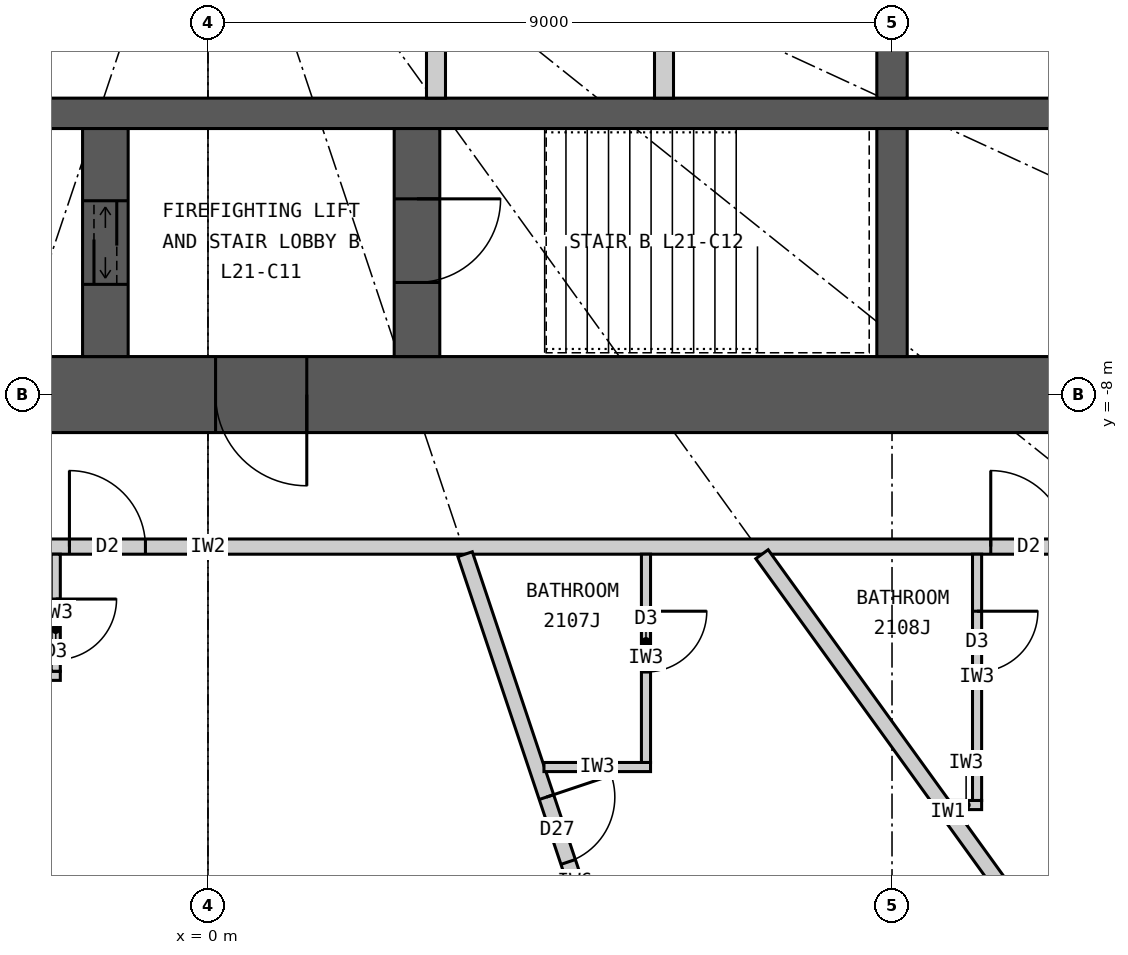
"""IFC4 building model, lengths in metres.
Left out: names, types, materials, properties, quantities, classifications, styles, units other than length and angle.
Written with IfcOpenShell. Run it as: python <this file> out.ifc"""

import sys

from ifc_helpers import new_model, si_unit, direction, frame, frame_2d, origin, place, context, subcontext, project, spatial, rectangle, extrude, element, fill, save


model = new_model("IFC4")
c1 = context("Model", 3, precision=1e-05, world=origin(), true_north=direction((0.0, 1.0)))
c2 = subcontext(c1, "Body", "Model", "MODEL_VIEW")
j1 = project(units=[si_unit("LENGTHUNIT", "METRE"), si_unit("PLANEANGLEUNIT", "RADIAN")], contexts=[c1])
p1 = place(None, origin())
s1 = spatial("IfcSite", under=j1, at=p1, CompositionType="ELEMENT")
p2 = place(p1, origin())
s2 = spatial("IfcBuilding", under=s1, at=p2, CompositionType="ELEMENT")
p3 = place(p2, frame((0.0, 0.0, 83.7)))
s3 = spatial("IfcBuildingStorey", under=s2, at=p3, CompositionType="ELEMENT", Elevation=83.7)
p4 = place(p3, frame((12.5, -8.0, 0.0), z_axis=(0.0, 0.0, 1.0), x_axis=(-1.0, 0.0, 0.0)))
e1 = element("IfcWall", 1, at=p4, inside=s3, PredefinedType="SHEAR", context=c2, shape_type="SweptSolid", body=[
    extrude(rectangle(XDim=25.0, YDim=1.0, at=frame_2d((12.5, 0.0))), origin(), (0.0, 0.0, 1.0), 3.3),
])
p5 = place(p4, frame((11.2, 0.0, 0.0)))
e2 = element("IfcOpeningElement", 2, at=p5, cuts=e1, PredefinedType="OPENING", context=c2, shape_type="SweptSolid", body=[
    extrude(rectangle(XDim=1.2, YDim=2.2, at=frame_2d((0.6, 1.1))), frame((0.0, 0.51, 0.0), z_axis=(0.0, -1.0, 0.0), x_axis=(1.0, 0.0, 0.0)), (0.0, 0.0, 1.0), 1.02),
])
p6 = place(p4, frame((18.8, 0.0, 0.0)))
e3 = element("IfcOpeningElement", 3, at=p6, cuts=e1, PredefinedType="OPENING", context=c2, shape_type="SweptSolid", body=[
    extrude(rectangle(XDim=0.9, YDim=2.2, at=frame_2d((0.45, 1.1))), frame((0.0, 0.51, 0.0), z_axis=(0.0, -1.0, 0.0), x_axis=(1.0, 0.0, 0.0)), (0.0, 0.0, 1.0), 1.02),
])
p7 = place(p3, frame((-11.5, -4.3, 0.0), z_axis=(0.0, 0.0, 1.0), x_axis=(1.0, 0.0, 0.0)))
e4 = element("IfcWall", 4, at=p7, inside=s3, PredefinedType="SHEAR", context=c2, shape_type="SweptSolid", body=[
    extrude(rectangle(XDim=23.0, YDim=0.4, at=frame_2d((11.5, 0.0))), origin(), (0.0, 0.0, 1.0), 3.3),
])
p8 = place(p3, frame((9.0, -4.1, 0.0), z_axis=(0.0, 0.0, 1.0), x_axis=(0.0, 1.0, 0.0)))
e5 = element("IfcWall", 5, at=p8, inside=s3, PredefinedType="SHEAR", context=c2, shape_type="SweptSolid", body=[
    extrude(rectangle(XDim=2.35, YDim=0.4, at=frame_2d((1.175, 0.0))), origin(), (0.0, 0.0, 1.0), 3.3),
])
p9 = place(p3, frame((9.0, -7.5, 0.0), z_axis=(0.0, 0.0, 1.0), x_axis=(0.0, 1.0, 0.0)))
e6 = element("IfcWall", 6, at=p9, inside=s3, PredefinedType="SHEAR", context=c2, shape_type="SweptSolid", body=[
    extrude(rectangle(XDim=3.0, YDim=0.4, at=frame_2d((1.5, 0.0))), origin(), (0.0, 0.0, 1.0), 3.3),
])
p10 = place(p3, frame((2.75, -7.5, 0.0), z_axis=(0.0, 0.0, 1.0), x_axis=(0.0, 1.0, 0.0)))
e7 = element("IfcWall", 7, at=p10, inside=s3, PredefinedType="SHEAR", context=c2, shape_type="SweptSolid", body=[
    extrude(rectangle(XDim=3.0, YDim=0.6, at=frame_2d((1.5, 0.0))), origin(), (0.0, 0.0, 1.0), 3.3),
])
p11 = place(p10, frame((0.975, 0.0, 0.0)))
e8 = element("IfcOpeningElement", 8, at=p11, cuts=e7, PredefinedType="OPENING", context=c2, shape_type="SweptSolid", body=[
    extrude(rectangle(XDim=1.1, YDim=2.2, at=frame_2d((0.55, 1.1))), frame((0.0, 0.31, 0.0), z_axis=(0.0, -1.0, 0.0), x_axis=(1.0, 0.0, 0.0)), (0.0, 0.0, 1.0), 0.62),
])
p12 = place(p3, frame((-1.35, -7.5, 0.0), z_axis=(0.0, 0.0, 1.0), x_axis=(0.0, 1.0, 0.0)))
e9 = element("IfcWall", 9, at=p12, inside=s3, PredefinedType="SHEAR", context=c2, shape_type="SweptSolid", body=[
    extrude(rectangle(XDim=3.0, YDim=0.6, at=frame_2d((1.5, 0.0))), origin(), (0.0, 0.0, 1.0), 3.3),
])
p13 = place(p12, frame((0.95, 0.0, 0.0)))
e10 = element("IfcOpeningElement", 10, at=p13, cuts=e9, PredefinedType="OPENING", context=c2, shape_type="SweptSolid", body=[
    extrude(rectangle(XDim=1.1, YDim=2.2, at=frame_2d((0.55, 1.1))), frame((0.0, 0.31, 0.0), z_axis=(0.0, -1.0, 0.0), x_axis=(1.0, 0.0, 0.0)), (0.0, 0.0, 1.0), 0.62),
])
for number, where, z_axis, x_axis in (
    (11, (3.0, -4.1, 0.0), (0.0, 0.0, 1.0), (0.0, 1.0, 0.0)),
    (12, (6.0, -4.1, 0.0), (0.0, 0.0, 1.0), (0.0, 1.0, 0.0)),
):
    element("IfcWall", number, at=place(p3, frame(where, z_axis=z_axis, x_axis=x_axis)), inside=s3, PredefinedType="PARTITIONING", context=c2, shape_type="SweptSolid", body=[
        extrude(rectangle(XDim=2.35, YDim=0.25, at=frame_2d((1.175, 0.0))), origin(), (0.0, 0.0, 1.0), 3.3),
    ])
p14 = place(p3, frame((14.1, -10.0, 0.0), z_axis=(0.0, 0.0, 1.0), x_axis=(-1.0, 0.0, 0.0)))
e13 = element("IfcWall", 13, at=p14, inside=s3, PredefinedType="PARTITIONING", context=c2, shape_type="SweptSolid", body=[
    extrude(rectangle(XDim=28.2, YDim=0.2, at=frame_2d((14.1, 0.0))), origin(), (0.0, 0.0, 1.0), 3.12),
])
p15 = place(p14, frame((23.865, 0.0, 0.0)))
e14 = element("IfcOpeningElement", 14, at=p15, cuts=e13, PredefinedType="OPENING", context=c2, shape_type="SweptSolid", body=[
    extrude(rectangle(XDim=1.0, YDim=2.2, at=frame_2d((0.5, 1.1))), frame((0.0, 0.11, 0.0), z_axis=(0.0, -1.0, 0.0), x_axis=(1.0, 0.0, 0.0)), (0.0, 0.0, 1.0), 0.22),
])
p16 = place(p14, frame((18.529, 0.0, 0.0)))
e15 = element("IfcOpeningElement", 15, at=p16, cuts=e13, PredefinedType="OPENING", context=c2, shape_type="SweptSolid", body=[
    extrude(rectangle(XDim=1.0, YDim=2.2, at=frame_2d((0.5, 1.1))), frame((0.0, 0.11, 0.0), z_axis=(0.0, -1.0, 0.0), x_axis=(1.0, 0.0, 0.0)), (0.0, 0.0, 1.0), 0.22),
])
p17 = place(p14, frame((14.923, 0.0, 0.0)))
e16 = element("IfcOpeningElement", 16, at=p17, cuts=e13, PredefinedType="OPENING", context=c2, shape_type="SweptSolid", body=[
    extrude(rectangle(XDim=1.0, YDim=2.2, at=frame_2d((0.5, 1.1))), frame((0.0, 0.11, 0.0), z_axis=(0.0, -1.0, 0.0), x_axis=(1.0, 0.0, 0.0)), (0.0, 0.0, 1.0), 0.22),
])
p18 = place(p14, frame((2.801, 0.0, 0.0)))
e17 = element("IfcOpeningElement", 17, at=p18, cuts=e13, PredefinedType="OPENING", context=c2, shape_type="SweptSolid", body=[
    extrude(rectangle(XDim=1.0, YDim=2.2, at=frame_2d((0.5, 1.1))), frame((0.0, 0.11, 0.0), z_axis=(0.0, -1.0, 0.0), x_axis=(1.0, 0.0, 0.0)), (0.0, 0.0, 1.0), 0.22),
])
p19 = place(p3, frame((3.383, -10.1, 0.0), z_axis=(0.0, 0.0, 1.0), x_axis=(0.31759592231, -0.948226149256, 0.0)))
e18 = element("IfcWall", 18, at=p19, inside=s3, PredefinedType="PARTITIONING", context=c2, shape_type="SweptSolid", body=[
    extrude(rectangle(XDim=9.098, YDim=0.2, at=frame_2d((4.549, 0.0))), origin(), (0.0, 0.0, 1.0), 2.32),
])
p20 = place(p19, frame((3.37, 0.0, 0.0)))
e19 = element("IfcOpeningElement", 19, at=p20, cuts=e18, PredefinedType="OPENING", context=c2, shape_type="SweptSolid", body=[
    extrude(rectangle(XDim=0.9, YDim=2.1, at=frame_2d((0.45, 1.05))), frame((0.0, 0.11, 0.0), z_axis=(0.0, -1.0, 0.0), x_axis=(1.0, 0.0, 0.0)), (0.0, 0.0, 1.0), 0.22),
])
p21 = place(p3, frame((7.289, -10.1, 0.0), z_axis=(0.0, 0.0, 1.0), x_axis=(0.585198353053, -0.810890182197, 0.0)))
e20 = element("IfcWall", 20, at=p21, inside=s3, PredefinedType="PARTITIONING", context=c2, shape_type="SweptSolid", body=[
    extrude(rectangle(XDim=8.36, YDim=0.2, at=frame_2d((4.18, 0.0))), origin(), (0.0, 0.0, 1.0), 2.32),
])
p22 = place(p3, frame((-3.819, -11.7, 0.0), z_axis=(0.0, 0.0, 1.0), x_axis=(1.0, 0.0, 0.0)))
e21 = element("IfcWall", 21, at=p22, inside=s3, PredefinedType="PARTITIONING", context=c2, shape_type="SweptSolid", body=[
    extrude(rectangle(XDim=1.876, YDim=0.12, at=frame_2d((0.938, 0.0))), origin(), (0.0, 0.0, 1.0), 3.12),
])
p23 = place(p3, frame((-2.003, -10.1, 0.0), z_axis=(0.0, 0.0, 1.0), x_axis=(0.0, -1.0, 0.0)))
e22 = element("IfcWall", 22, at=p23, inside=s3, PredefinedType="PARTITIONING", context=c2, shape_type="SweptSolid", body=[
    extrude(rectangle(XDim=1.54, YDim=0.12, at=frame_2d((0.77, 0.0))), origin(), (0.0, 0.0, 1.0), 3.12),
])
p24 = place(p23, frame((0.59, 0.0, 0.0)))
e23 = element("IfcOpeningElement", 23, at=p24, cuts=e22, PredefinedType="OPENING", context=c2, shape_type="SweptSolid", body=[
    extrude(rectangle(XDim=0.8, YDim=2.1, at=frame_2d((0.4, 1.05))), frame((0.0, 0.07, 0.0), z_axis=(0.0, -1.0, 0.0), x_axis=(1.0, 0.0, 0.0)), (0.0, 0.0, 1.0), 0.14),
])
p25 = place(p3, frame((4.421, -12.9, 0.0), z_axis=(0.0, 0.0, 1.0), x_axis=(1.0, 0.0, 0.0)))
e24 = element("IfcWall", 24, at=p25, inside=s3, PredefinedType="PARTITIONING", context=c2, shape_type="SweptSolid", body=[
    extrude(rectangle(XDim=1.402, YDim=0.12, at=frame_2d((0.701, 0.0))), origin(), (0.0, 0.0, 1.0), 3.12),
])
p26 = place(p3, frame((5.763, -10.1, 0.0), z_axis=(0.0, 0.0, 1.0), x_axis=(0.0, -1.0, 0.0)))
e25 = element("IfcWall", 25, at=p26, inside=s3, PredefinedType="PARTITIONING", context=c2, shape_type="SweptSolid", body=[
    extrude(rectangle(XDim=2.74, YDim=0.12, at=frame_2d((1.37, 0.0))), origin(), (0.0, 0.0, 1.0), 3.12),
])
p27 = place(p26, frame((0.75, 0.0, 0.0)))
e26 = element("IfcOpeningElement", 26, at=p27, cuts=e25, PredefinedType="OPENING", context=c2, shape_type="SweptSolid", body=[
    extrude(rectangle(XDim=0.8, YDim=2.1, at=frame_2d((0.4, 1.05))), frame((0.0, 0.07, 0.0), z_axis=(0.0, -1.0, 0.0), x_axis=(1.0, 0.0, 0.0)), (0.0, 0.0, 1.0), 0.14),
])
p28 = place(p3, frame((9.771, -13.4, 0.0), z_axis=(0.0, 0.0, 1.0), x_axis=(1.0, 0.0, 0.0)))
e27 = element("IfcWall", 27, at=p28, inside=s3, PredefinedType="PARTITIONING", context=c2, shape_type="SweptSolid", body=[
    extrude(rectangle(XDim=0.408, YDim=0.12, at=frame_2d((0.204, 0.0))), origin(), (0.0, 0.0, 1.0), 3.12),
])
p29 = place(p3, frame((10.119, -10.1, 0.0), z_axis=(0.0, 0.0, 1.0), x_axis=(0.0, -1.0, 0.0)))
e28 = element("IfcWall", 28, at=p29, inside=s3, PredefinedType="PARTITIONING", context=c2, shape_type="SweptSolid", body=[
    extrude(rectangle(XDim=3.24, YDim=0.12, at=frame_2d((1.62, 0.0))), origin(), (0.0, 0.0, 1.0), 3.12),
])
p30 = place(p29, frame((0.75, 0.0, 0.0)))
e29 = element("IfcOpeningElement", 29, at=p30, cuts=e28, PredefinedType="OPENING", context=c2, shape_type="SweptSolid", body=[
    extrude(rectangle(XDim=0.8, YDim=2.1, at=frame_2d((0.4, 1.05))), frame((0.0, 0.07, 0.0), z_axis=(0.0, -1.0, 0.0), x_axis=(1.0, 0.0, 0.0)), (0.0, 0.0, 1.0), 0.14),
])
p31 = place(p24, origin())
e30 = element("IfcDoor", 30, at=p31, inside=s3, OperationType="SINGLE_SWING_LEFT", PredefinedType="DOOR", context=c2, shape_type="SweptSolid", body=[
    extrude(rectangle(XDim=0.8, YDim=2.1, at=frame_2d((0.4, 1.05))), frame((0.0, 0.025, 0.0), z_axis=(0.0, -1.0, 0.0), x_axis=(1.0, 0.0, 0.0)), (0.0, 0.0, 1.0), 0.05),
])
fill(e23, e30)
p32 = place(p17, origin())
e31 = element("IfcDoor", 31, at=p32, inside=s3, OperationType="SINGLE_SWING_RIGHT", PredefinedType="DOOR", context=c2, shape_type="SweptSolid", body=[
    extrude(rectangle(XDim=1.0, YDim=2.2, at=frame_2d((0.5, 1.1))), frame((0.0, 0.025, 0.0), z_axis=(0.0, -1.0, 0.0), x_axis=(1.0, 0.0, 0.0)), (0.0, 0.0, 1.0), 0.05),
])
fill(e16, e31)
p33 = place(p27, origin())
e32 = element("IfcDoor", 32, at=p33, inside=s3, OperationType="SINGLE_SWING_LEFT", PredefinedType="DOOR", context=c2, shape_type="SweptSolid", body=[
    extrude(rectangle(XDim=0.8, YDim=2.1, at=frame_2d((0.4, 1.05))), frame((0.0, 0.025, 0.0), z_axis=(0.0, -1.0, 0.0), x_axis=(1.0, 0.0, 0.0)), (0.0, 0.0, 1.0), 0.05),
])
fill(e26, e32)
p34 = place(p20, origin())
e33 = element("IfcDoor", 33, at=p34, inside=s3, OperationType="SINGLE_SWING_LEFT", PredefinedType="DOOR", context=c2, shape_type="SweptSolid", body=[
    extrude(rectangle(XDim=0.9, YDim=2.1, at=frame_2d((0.45, 1.05))), frame((0.0, 0.025, 0.0), z_axis=(0.0, -1.0, 0.0), x_axis=(1.0, 0.0, 0.0)), (0.0, 0.0, 1.0), 0.05),
])
fill(e19, e33)
p35 = place(p30, origin())
e34 = element("IfcDoor", 34, at=p35, inside=s3, OperationType="SINGLE_SWING_LEFT", PredefinedType="DOOR", context=c2, shape_type="SweptSolid", body=[
    extrude(rectangle(XDim=0.8, YDim=2.1, at=frame_2d((0.4, 1.05))), frame((0.0, 0.025, 0.0), z_axis=(0.0, -1.0, 0.0), x_axis=(1.0, 0.0, 0.0)), (0.0, 0.0, 1.0), 0.05),
])
fill(e29, e34)
p36 = place(p18, origin())
e35 = element("IfcDoor", 35, at=p36, inside=s3, OperationType="SINGLE_SWING_RIGHT", PredefinedType="DOOR", context=c2, shape_type="SweptSolid", body=[
    extrude(rectangle(XDim=1.0, YDim=2.2, at=frame_2d((0.5, 1.1))), frame((0.0, 0.025, 0.0), z_axis=(0.0, -1.0, 0.0), x_axis=(1.0, 0.0, 0.0)), (0.0, 0.0, 1.0), 0.05),
])
fill(e17, e35)
p37 = place(p5, origin())
e36 = element("IfcDoor", 36, at=p37, inside=s3, OperationType="SINGLE_SWING_LEFT", PredefinedType="DOOR", context=c2, shape_type="SweptSolid", body=[
    extrude(rectangle(XDim=1.2, YDim=2.2, at=frame_2d((0.6, 1.1))), frame((0.0, 0.025, 0.0), z_axis=(0.0, -1.0, 0.0), x_axis=(1.0, 0.0, 0.0)), (0.0, 0.0, 1.0), 0.05),
])
fill(e2, e36)
p38 = place(p11, origin())
e37 = element("IfcDoor", 37, at=p38, inside=s3, OperationType="SINGLE_SWING_RIGHT", PredefinedType="DOOR", context=c2, shape_type="SweptSolid", body=[
    extrude(rectangle(XDim=1.1, YDim=2.2, at=frame_2d((0.55, 1.1))), frame((0.0, 0.025, 0.0), z_axis=(0.0, -1.0, 0.0), x_axis=(1.0, 0.0, 0.0)), (0.0, 0.0, 1.0), 0.05),
])
fill(e8, e37)
p39 = place(p13, origin())
e38 = element("IfcDoor", 38, at=p39, inside=s3, OperationType="DOUBLE_DOOR_SLIDING", PredefinedType="DOOR", context=c2, shape_type="SweptSolid", body=[
    extrude(rectangle(XDim=1.1, YDim=2.2, at=frame_2d((0.55, 1.1))), frame((0.0, 0.025, 0.0), z_axis=(0.0, -1.0, 0.0), x_axis=(1.0, 0.0, 0.0)), (0.0, 0.0, 1.0), 0.05),
])
fill(e10, e38)
save(model, sys.argv[1])
